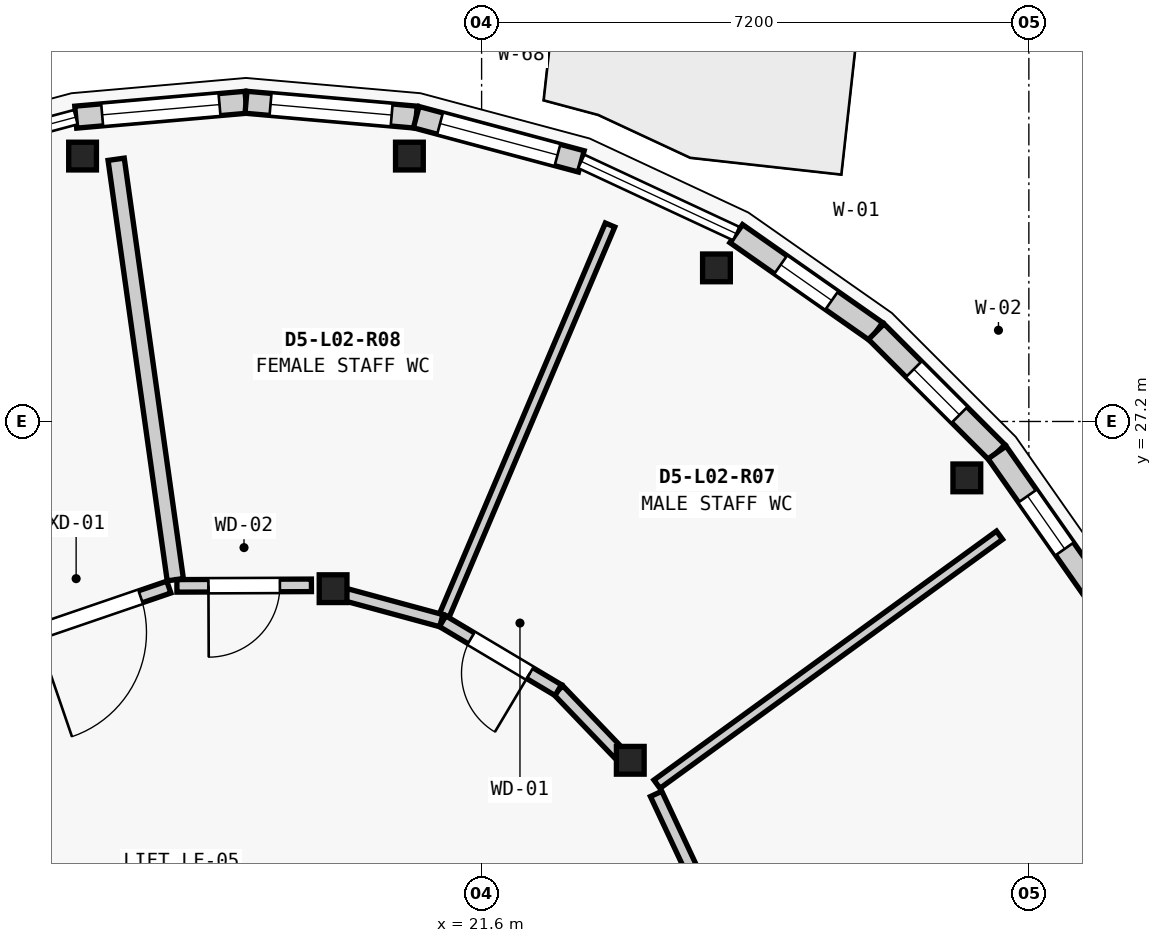
"""IFC4 building model, lengths in metres.
Left out: names, types, materials, properties, quantities, classifications, styles, units other than length and angle.
Written with IfcOpenShell. Run it as: python <this file> out.ifc"""

import sys

from ifc_helpers import new_model, si_unit, direction, frame, frame_2d, origin, origin_2d, place, context, subcontext, project, spatial, rectangle, extrude, element, fill, save


model = new_model("IFC4")
c1 = context("Model", 3, precision=1e-05, world=origin(), true_north=direction((0.0, 1.0)))
c2 = subcontext(c1, "Body", "Model", "MODEL_VIEW")
j1 = project(units=[si_unit("LENGTHUNIT", "METRE"), si_unit("PLANEANGLEUNIT", "RADIAN")], contexts=[c1])
p1 = place(None, origin())
s1 = spatial("IfcSite", under=j1, at=p1, CompositionType="ELEMENT")
p2 = place(p1, origin())
s2 = spatial("IfcBuilding", under=s1, at=p2, CompositionType="ELEMENT")
p3 = place(p2, frame((0.0, 0.0, 8.75)))
s3 = spatial("IfcBuildingStorey", under=s2, at=p3, CompositionType="ELEMENT", Elevation=8.75)
for number, where, z_axis, x_axis in (
    (1, (27.984, 26.458, 0.0), (0.0, 0.0, 1.0), (1.0, 0.0, 0.0)),
    (2, (24.69, 29.221, 0.0), (0.0, 0.0, 1.0), (1.0, 0.0, 0.0)),
    (3, (20.65, 30.692, 0.0), (0.0, 0.0, 1.0), (1.0, 0.0, 0.0)),
    (4, (16.35, 30.692, 0.0), (0.0, 0.0, 1.0), (1.0, 0.0, 0.0)),
    (5, (23.556, 22.742, 0.0), (0.0, 0.0, 1.0), (1.0, 0.0, 0.0)),
    (6, (19.646, 25.0, 0.0), (0.0, 0.0, 1.0), (1.0, 0.0, 0.0)),
):
    element("IfcColumn", number, at=place(p3, frame(where, z_axis=z_axis, x_axis=x_axis)), inside=s3, PredefinedType="COLUMN", context=c2, shape_type="SweptSolid", body=[
        extrude(rectangle(XDim=0.365, YDim=0.365, at=origin_2d()), origin(), (0.0, 0.0, 1.0), 4.2),
    ])
p4 = place(p3, frame((16.26, 31.204, 0.0), z_axis=(0.0, 0.0, 1.0), x_axis=(0.996201374201, 0.087079400775, 0.0)))
e7 = element("IfcWall", 7, at=p4, inside=s3, PredefinedType="ELEMENTEDWALL", context=c2, shape_type="SweptSolid", body=[
    extrude(rectangle(XDim=2.249, YDim=0.29, at=frame_2d((1.124, 0.0))), origin(), (0.0, 0.0, 1.0), 3.329),
])
p5 = place(p4, frame((0.349, 0.0, 0.85)))
e8 = element("IfcOpeningElement", 8, at=p5, cuts=e7, PredefinedType="OPENING", context=c2, shape_type="SweptSolid", body=[
    extrude(rectangle(XDim=1.55, YDim=1.8, at=frame_2d((0.775, 0.9))), frame((0.0, 0.155, 0.0), z_axis=(0.0, -1.0, 0.0), x_axis=(1.0, 0.0, 0.0)), (0.0, 0.0, 1.0), 0.31),
])
p6 = place(p3, frame((18.5, 31.4, 0.0), z_axis=(0.0, 0.0, 1.0), x_axis=(0.996201374201, -0.087079400775, 0.0)))
e9 = element("IfcWall", 9, at=p6, inside=s3, PredefinedType="ELEMENTEDWALL", context=c2, shape_type="SweptSolid", body=[
    extrude(rectangle(XDim=2.249, YDim=0.29, at=frame_2d((1.124, 0.0))), origin(), (0.0, 0.0, 1.0), 3.329),
])
p7 = place(p6, frame((0.324, 0.0, 0.85)))
e10 = element("IfcOpeningElement", 10, at=p7, cuts=e9, PredefinedType="OPENING", context=c2, shape_type="SweptSolid", body=[
    extrude(rectangle(XDim=1.6, YDim=1.55, at=frame_2d((0.8, 0.775))), frame((0.0, 0.155, 0.0), z_axis=(0.0, -1.0, 0.0), x_axis=(1.0, 0.0, 0.0)), (0.0, 0.0, 1.0), 0.31),
])
p8 = place(p3, frame((20.74, 31.204, 0.0), z_axis=(0.0, 0.0, 1.0), x_axis=(0.96592430538, -0.258824721145, 0.0)))
e11 = element("IfcWall", 11, at=p8, inside=s3, PredefinedType="ELEMENTEDWALL", context=c2, shape_type="SweptSolid", body=[
    extrude(rectangle(XDim=2.249, YDim=0.29, at=frame_2d((1.125, 0.0))), origin(), (0.0, 0.0, 1.0), 3.329),
])
p9 = place(p8, frame((0.324, 0.0, 0.85)))
e12 = element("IfcOpeningElement", 12, at=p9, cuts=e11, PredefinedType="OPENING", context=c2, shape_type="SweptSolid", body=[
    extrude(rectangle(XDim=1.6, YDim=1.85, at=frame_2d((0.8, 0.925))), frame((0.0, 0.155, 0.0), z_axis=(0.0, -1.0, 0.0), x_axis=(1.0, 0.0, 0.0)), (0.0, 0.0, 1.0), 0.31),
])
p10 = place(p3, frame((24.95, 29.672, 0.0), z_axis=(0.0, 0.0, 1.0), x_axis=(0.819104393925, -0.573644482107, 0.0)))
e13 = element("IfcWall", 13, at=p10, inside=s3, PredefinedType="ELEMENTEDWALL", context=c2, shape_type="SweptSolid", body=[
    extrude(rectangle(XDim=2.249, YDim=0.29, at=frame_2d((1.125, 0.0))), origin(), (0.0, 0.0, 1.0), 3.329),
])
p11 = place(p10, frame((0.714, 0.0, 0.85)))
e14 = element("IfcOpeningElement", 14, at=p11, cuts=e13, PredefinedType="OPENING", context=c2, shape_type="SweptSolid", body=[
    extrude(rectangle(XDim=0.82, YDim=1.45, at=frame_2d((0.41, 0.725))), frame((0.0, 0.155, 0.0), z_axis=(0.0, -1.0, 0.0), x_axis=(1.0, 0.0, 0.0)), (0.0, 0.0, 1.0), 0.31),
])
p12 = place(p3, frame((26.792, 28.382, 0.0), z_axis=(0.0, 0.0, 1.0), x_axis=(0.707106781187, -0.707106781187, 0.0)))
e15 = element("IfcWall", 15, at=p12, inside=s3, PredefinedType="ELEMENTEDWALL", context=c2, shape_type="SweptSolid", body=[
    extrude(rectangle(XDim=2.249, YDim=0.29, at=frame_2d((1.125, 0.0))), origin(), (0.0, 0.0, 1.0), 3.329),
])
p13 = place(p12, frame((0.699, 0.0, 0.85)))
e16 = element("IfcOpeningElement", 16, at=p13, cuts=e15, PredefinedType="OPENING", context=c2, shape_type="SweptSolid", body=[
    extrude(rectangle(XDim=0.85, YDim=1.5, at=frame_2d((0.425, 0.75))), frame((0.0, 0.155, 0.0), z_axis=(0.0, -1.0, 0.0), x_axis=(1.0, 0.0, 0.0)), (0.0, 0.0, 1.0), 0.31),
])
p14 = place(p3, frame((28.382, 26.792, 0.0), z_axis=(0.0, 0.0, 1.0), x_axis=(0.573644482107, -0.819104393925, 0.0)))
e17 = element("IfcWall", 17, at=p14, inside=s3, PredefinedType="ELEMENTEDWALL", context=c2, shape_type="SweptSolid", body=[
    extrude(rectangle(XDim=2.249, YDim=0.29, at=frame_2d((1.125, 0.0))), origin(), (0.0, 0.0, 1.0), 3.329),
])
p15 = place(p14, frame((0.699, 0.0, 0.85)))
e18 = element("IfcOpeningElement", 18, at=p15, cuts=e17, PredefinedType="OPENING", context=c2, shape_type="SweptSolid", body=[
    extrude(rectangle(XDim=0.85, YDim=1.75, at=frame_2d((0.425, 0.875))), frame((0.0, 0.155, 0.0), z_axis=(0.0, -1.0, 0.0), x_axis=(1.0, 0.0, 0.0)), (0.0, 0.0, 1.0), 0.31),
])
p16 = place(p3, frame((17.57, 25.118, 0.0), z_axis=(0.0, 0.0, 1.0), x_axis=(-0.139279606871, 0.990253094471, 0.0)))
e19 = element("IfcWall", 19, at=p16, inside=s3, PredefinedType="SOLIDWALL", context=c2, shape_type="SweptSolid", body=[
    extrude(rectangle(XDim=5.586, YDim=0.215, at=frame_2d((2.793, 0.0))), origin(), (0.0, 0.0, 1.0), 3.304),
])
p17 = place(p3, frame((23.907, 22.428, 0.0), z_axis=(0.0, 0.0, 1.0), x_axis=(0.808989937146, 0.58782249157, 0.0)))
e20 = element("IfcWall", 20, at=p17, inside=s3, PredefinedType="PLUMBINGWALL", context=c2, shape_type="SweptSolid", body=[
    extrude(rectangle(XDim=5.571, YDim=0.135, at=frame_2d((2.786, 0.0))), origin(), (0.0, 0.0, 1.0), 3.304),
])
p18 = place(p3, frame((21.111, 24.652, 0.0), z_axis=(0.0, 0.0, 1.0), x_axis=(0.390762345339, 0.920491602061, 0.0)))
e21 = element("IfcWall", 21, at=p18, inside=s3, PredefinedType="PLUMBINGWALL", context=c2, shape_type="SweptSolid", body=[
    extrude(rectangle(XDim=5.576, YDim=0.135, at=frame_2d((2.788, 0.0))), origin(), (0.0, 0.0, 1.0), 3.304),
])
p19 = place(p3, frame((17.485, 25.021, 0.0), z_axis=(0.0, 0.0, 1.0), x_axis=(-0.94617630085, -0.323651676514, 0.0)))
e22 = element("IfcWall", 22, at=p19, inside=s3, PredefinedType="PARTITIONING", context=c2, shape_type="SweptSolid", body=[
    extrude(rectangle(XDim=2.237, YDim=0.165, at=frame_2d((1.118, 0.0))), origin(), (0.0, 0.0, 1.0), 3.304),
])
p20 = place(p19, frame((0.393, 0.0, 0.0)))
e23 = element("IfcOpeningElement", 23, at=p20, cuts=e22, PredefinedType="OPENING", context=c2, shape_type="SweptSolid", body=[
    extrude(rectangle(XDim=1.45, YDim=2.28, at=frame_2d((0.725, 1.14))), frame((0.0, 0.093, 0.0), z_axis=(0.0, -1.0, 0.0), x_axis=(1.0, 0.0, 0.0)), (0.0, 0.0, 1.0), 0.185),
])
p21 = place(p3, frame((24.875, 20.208, 0.0), z_axis=(0.0, 0.0, 1.0), x_axis=(-0.423851557369, 0.9057316696, 0.0)))
e24 = element("IfcWall", 24, at=p21, inside=s3, PredefinedType="PARTITIONING", context=c2, shape_type="SweptSolid", body=[
    extrude(rectangle(XDim=2.31, YDim=0.165, at=frame_2d((1.155, 0.0))), origin(), (0.0, 0.0, 1.0), 3.304),
])
p22 = place(p3, frame((23.398, 22.842, 0.0), z_axis=(0.0, 0.0, 1.0), x_axis=(-0.692068123198, 0.721832191616, 0.0)))
e25 = element("IfcWall", 25, at=p22, inside=s3, PredefinedType="PARTITIONING", context=c2, shape_type="SweptSolid", body=[
    extrude(rectangle(XDim=1.14, YDim=0.165, at=frame_2d((0.57, 0.0))), origin(), (0.0, 0.0, 1.0), 3.304),
])
p23 = place(p3, frame((22.609, 23.665, 0.0), z_axis=(0.0, 0.0, 1.0), x_axis=(-0.859033212717, 0.511919856471, 0.0)))
e26 = element("IfcWall", 26, at=p23, inside=s3, PredefinedType="PARTITIONING", context=c2, shape_type="SweptSolid", body=[
    extrude(rectangle(XDim=1.772, YDim=0.165, at=frame_2d((0.886, 0.0))), origin(), (0.0, 0.0, 1.0), 3.304),
])
p24 = place(p23, frame((0.435, 0.0, 0.0)))
e27 = element("IfcOpeningElement", 27, at=p24, cuts=e26, PredefinedType="OPENING", context=c2, shape_type="SweptSolid", body=[
    extrude(rectangle(XDim=0.9, YDim=2.1, at=frame_2d((0.45, 1.05))), frame((0.0, 0.093, 0.0), z_axis=(0.0, -1.0, 0.0), x_axis=(1.0, 0.0, 0.0)), (0.0, 0.0, 1.0), 0.185),
])
p25 = place(p3, frame((21.07, 24.579, 0.0), z_axis=(0.0, 0.0, 1.0), x_axis=(-0.965053473757, 0.262053034306, 0.0)))
e28 = element("IfcWall", 28, at=p25, inside=s3, PredefinedType="PARTITIONING", context=c2, shape_type="SweptSolid", body=[
    extrude(rectangle(XDim=1.301, YDim=0.165, at=frame_2d((0.65, 0.0))), origin(), (0.0, 0.0, 1.0), 3.304),
])
p26 = place(p3, frame((19.361, 25.044, 0.0), z_axis=(0.0, 0.0, 1.0), x_axis=(-0.999992542295, -0.003862040163, 0.0)))
e29 = element("IfcWall", 29, at=p26, inside=s3, PredefinedType="PARTITIONING", context=c2, shape_type="SweptSolid", body=[
    extrude(rectangle(XDim=1.77, YDim=0.165, at=frame_2d((0.885, 0.0))), origin(), (0.0, 0.0, 1.0), 3.304),
])
p27 = place(p26, frame((0.415, 0.0, 0.0)))
e30 = element("IfcOpeningElement", 30, at=p27, cuts=e29, PredefinedType="OPENING", context=c2, shape_type="SweptSolid", body=[
    extrude(rectangle(XDim=0.94, YDim=2.1, at=frame_2d((0.47, 1.05))), frame((0.0, 0.093, 0.0), z_axis=(0.0, -1.0, 0.0), x_axis=(1.0, 0.0, 0.0)), (0.0, 0.0, 1.0), 0.185),
])
p28 = place(p5, origin())
e31 = element("IfcWindow", 31, at=p28, inside=s3, PartitioningType="SINGLE_PANEL", PredefinedType="WINDOW", context=c2, shape_type="SweptSolid", body=[
    extrude(rectangle(XDim=1.55, YDim=1.8, at=frame_2d((0.775, 0.9))), frame((0.0, 0.03, 0.0), z_axis=(0.0, -1.0, 0.0), x_axis=(1.0, 0.0, 0.0)), (0.0, 0.0, 1.0), 0.06),
])
fill(e8, e31)
p29 = place(p7, origin())
e32 = element("IfcWindow", 32, at=p29, inside=s3, PartitioningType="SINGLE_PANEL", PredefinedType="WINDOW", context=c2, shape_type="SweptSolid", body=[
    extrude(rectangle(XDim=1.6, YDim=1.55, at=frame_2d((0.8, 0.775))), frame((0.0, 0.03, 0.0), z_axis=(0.0, -1.0, 0.0), x_axis=(1.0, 0.0, 0.0)), (0.0, 0.0, 1.0), 0.06),
])
fill(e10, e32)
p30 = place(p9, origin())
e33 = element("IfcWindow", 33, at=p30, inside=s3, PartitioningType="SINGLE_PANEL", PredefinedType="WINDOW", context=c2, shape_type="SweptSolid", body=[
    extrude(rectangle(XDim=1.6, YDim=1.85, at=frame_2d((0.8, 0.925))), frame((0.0, 0.03, 0.0), z_axis=(0.0, -1.0, 0.0), x_axis=(1.0, 0.0, 0.0)), (0.0, 0.0, 1.0), 0.06),
])
fill(e12, e33)
p31 = place(p11, origin())
e34 = element("IfcWindow", 34, at=p31, inside=s3, PartitioningType="SINGLE_PANEL", PredefinedType="WINDOW", context=c2, shape_type="SweptSolid", body=[
    extrude(rectangle(XDim=0.82, YDim=1.45, at=frame_2d((0.41, 0.725))), frame((0.0, 0.03, 0.0), z_axis=(0.0, -1.0, 0.0), x_axis=(1.0, 0.0, 0.0)), (0.0, 0.0, 1.0), 0.06),
])
fill(e14, e34)
p32 = place(p13, origin())
e35 = element("IfcWindow", 35, at=p32, inside=s3, PartitioningType="SINGLE_PANEL", PredefinedType="WINDOW", context=c2, shape_type="SweptSolid", body=[
    extrude(rectangle(XDim=0.85, YDim=1.5, at=frame_2d((0.425, 0.75))), frame((0.0, 0.03, 0.0), z_axis=(0.0, -1.0, 0.0), x_axis=(1.0, 0.0, 0.0)), (0.0, 0.0, 1.0), 0.06),
])
fill(e16, e35)
p33 = place(p15, origin())
e36 = element("IfcWindow", 36, at=p33, inside=s3, PartitioningType="SINGLE_PANEL", PredefinedType="WINDOW", context=c2, shape_type="SweptSolid", body=[
    extrude(rectangle(XDim=0.85, YDim=1.75, at=frame_2d((0.425, 0.875))), frame((0.0, 0.03, 0.0), z_axis=(0.0, -1.0, 0.0), x_axis=(1.0, 0.0, 0.0)), (0.0, 0.0, 1.0), 0.06),
])
fill(e18, e36)
p34 = place(p20, origin())
e37 = element("IfcDoor", 37, at=p34, inside=s3, OperationType="SINGLE_SWING_RIGHT", PredefinedType="DOOR", context=c2, shape_type="SweptSolid", body=[
    extrude(rectangle(XDim=1.45, YDim=2.28, at=frame_2d((0.725, 1.14))), frame((0.0, 0.025, 0.0), z_axis=(0.0, -1.0, 0.0), x_axis=(1.0, 0.0, 0.0)), (0.0, 0.0, 1.0), 0.05),
])
fill(e23, e37)
p35 = place(p24, origin())
e38 = element("IfcDoor", 38, at=p35, inside=s3, OperationType="SINGLE_SWING_LEFT", PredefinedType="DOOR", context=c2, shape_type="SweptSolid", body=[
    extrude(rectangle(XDim=0.9, YDim=2.1, at=frame_2d((0.45, 1.05))), frame((0.0, 0.025, 0.0), z_axis=(0.0, -1.0, 0.0), x_axis=(1.0, 0.0, 0.0)), (0.0, 0.0, 1.0), 0.05),
])
fill(e27, e38)
p36 = place(p27, origin())
e39 = element("IfcDoor", 39, at=p36, inside=s3, OperationType="SINGLE_SWING_RIGHT", PredefinedType="DOOR", context=c2, shape_type="SweptSolid", body=[
    extrude(rectangle(XDim=0.94, YDim=2.1, at=frame_2d((0.47, 1.05))), frame((0.0, 0.025, 0.0), z_axis=(0.0, -1.0, 0.0), x_axis=(1.0, 0.0, 0.0)), (0.0, 0.0, 1.0), 0.05),
])
fill(e30, e39)
save(model, sys.argv[1])
